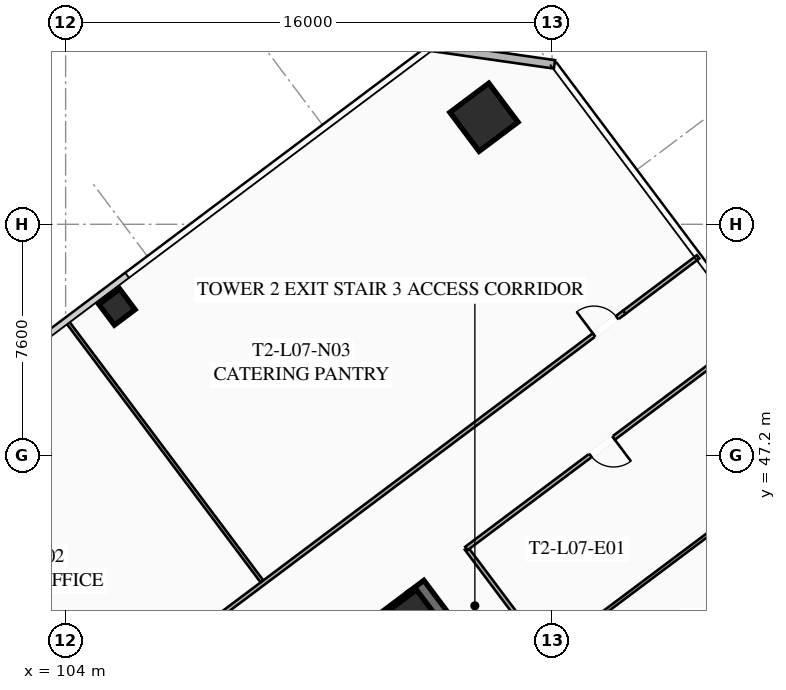
"""IFC4 building model, lengths in metres.
Left out: names, types, materials, properties, quantities, classifications, styles, units other than length and angle.
Written with IfcOpenShell. Run it as: python <this file> out.ifc"""

import sys

from ifc_helpers import new_model, si_unit, direction, frame, frame_2d, origin, origin_2d, place, context, subcontext, project, spatial, rectangle, hollow_rectangle, extrude, element, fill, save


model = new_model("IFC4")
c1 = context("Model", 3, precision=1e-05, world=origin(), true_north=direction((0.0, 1.0)))
c2 = subcontext(c1, "Body", "Model", "MODEL_VIEW")
j1 = project(units=[si_unit("LENGTHUNIT", "METRE"), si_unit("PLANEANGLEUNIT", "RADIAN")], contexts=[c1])
p1 = place(None, origin())
s1 = spatial("IfcSite", under=j1, at=p1, CompositionType="ELEMENT")
p2 = place(p1, origin())
s2 = spatial("IfcBuilding", under=s1, at=p2, CompositionType="ELEMENT")
p3 = place(p2, frame((0.0, 0.0, 31.7)))
s3 = spatial("IfcBuildingStorey", under=s2, at=p3, CompositionType="ELEMENT", Elevation=31.7)
p4 = place(p3, frame((115.524, 42.893, 0.0), z_axis=(0.0, 0.0, 1.0), x_axis=(0.600005007985, -0.799996243986, 0.0)))
e1 = element("IfcWall", 1, at=p4, inside=s3, PredefinedType="SHEAR", context=c2, shape_type="SweptSolid", body=[
    extrude(rectangle(XDim=15.6, YDim=0.65, at=frame_2d((7.8, 0.0))), origin(), (0.0, 0.0, 1.0), 3.55),
])
p5 = place(p3, frame((103.571, 33.522, 0.0), z_axis=(0.0, 0.0, 1.0), x_axis=(0.799998028465, 0.600002628705, 0.0)))
e2 = element("IfcWall", 2, at=p5, inside=s3, PredefinedType="SHEAR", context=c2, shape_type="SweptSolid", body=[
    extrude(rectangle(XDim=14.86, YDim=0.65, at=frame_2d((7.43, 0.0))), origin(), (0.0, 0.0, 1.0), 3.55),
])
p6 = place(p5, frame((4.48, 0.0, 0.0)))
e3 = element("IfcOpeningElement", 3, at=p6, cuts=e2, PredefinedType="OPENING", context=c2, shape_type="SweptSolid", body=[
    extrude(rectangle(XDim=1.25, YDim=2.25, at=frame_2d((0.625, 1.125))), frame((0.0, 0.335, 0.0), z_axis=(0.0, -1.0, 0.0), x_axis=(1.0, 0.0, 0.0)), (0.0, 0.0, 1.0), 0.67),
])
p7 = place(p5, frame((9.53, 0.0, 0.0)))
e4 = element("IfcOpeningElement", 4, at=p7, cuts=e2, PredefinedType="OPENING", context=c2, shape_type="SweptSolid", body=[
    extrude(rectangle(XDim=1.25, YDim=2.25, at=frame_2d((0.625, 1.125))), frame((0.0, 0.335, 0.0), z_axis=(0.0, -1.0, 0.0), x_axis=(1.0, 0.0, 0.0)), (0.0, 0.0, 1.0), 0.67),
])
p8 = place(p3, frame((115.41, 41.87, 0.0), z_axis=(0.0, 0.0, 1.0), x_axis=(0.799999996291, 0.600000004945, 0.0)))
e5 = element("IfcColumn", 5, at=p8, inside=s3, PredefinedType="COLUMN", context=c2, shape_type="SweptSolid", body=[
    extrude(hollow_rectangle(XDim=1.3, YDim=1.3, WallThickness=0.05, at=origin_2d()), origin(), (0.0, 0.0, 1.0), 3.35),
])
p9 = place(p3, frame((117.76, 58.32, 0.0), z_axis=(0.0, 0.0, 1.0), x_axis=(0.799999996291, 0.600000004945, 0.0)))
e6 = element("IfcColumn", 6, at=p9, inside=s3, PredefinedType="COLUMN", context=c2, shape_type="SweptSolid", body=[
    extrude(hollow_rectangle(XDim=1.6, YDim=1.6, WallThickness=0.06, at=origin_2d()), origin(), (0.0, 0.0, 1.0), 3.35),
])
p10 = place(p3, frame((105.69, 52.08, 0.0), z_axis=(0.0, 0.0, 1.0), x_axis=(0.799999996291, 0.600000004945, 0.0)))
e7 = element("IfcColumn", 7, at=p10, inside=s3, PredefinedType="COLUMN", context=c2, shape_type="SweptSolid", body=[
    extrude(hollow_rectangle(XDim=0.85, YDim=0.85, WallThickness=0.035, at=origin_2d()), origin(), (0.0, 0.0, 1.0), 3.35),
])
p11 = place(p3, frame((116.02, 60.64, 0.0), z_axis=(0.0, 0.0, 1.0), x_axis=(0.989955445613, -0.14137968631, 0.0)))
e8 = element("IfcWall", 8, at=p11, inside=s3, PredefinedType="SOLIDWALL", context=c2, shape_type="SweptSolid", body=[
    extrude(rectangle(XDim=4.101, YDim=0.28, at=frame_2d((2.051, 0.0))), origin(), (0.0, 0.0, 1.0), 3.35),
])
p12 = place(p3, frame((119.824, 40.618, 0.0), z_axis=(0.0, 0.0, 1.0), x_axis=(-0.599982243973, 0.800013316712, 0.0)))
e9 = element("IfcWall", 9, at=p12, inside=s3, PredefinedType="PARTITIONING", context=c2, shape_type="SweptSolid", body=[
    extrude(rectangle(XDim=4.4, YDim=0.135, at=frame_2d((2.2, 0.0))), origin(), (0.0, 0.0, 1.0), 2.703),
])
p13 = place(p3, frame((98.516, 34.012, 0.0), z_axis=(0.0, 0.0, 1.0), x_axis=(0.799998035726, 0.600002619023, 0.0)))
e10 = element("IfcWall", 10, at=p13, inside=s3, PredefinedType="PARTITIONING", context=c2, shape_type="SweptSolid", body=[
    extrude(rectangle(XDim=29.83, YDim=0.135, at=frame_2d((14.915, 0.0))), origin(), (0.0, 0.0, 1.0), 2.703),
])
p14 = place(p13, frame((0.3, 0.0, 0.0)))
e11 = element("IfcOpeningElement", 11, at=p14, cuts=e10, PredefinedType="OPENING", context=c2, shape_type="SweptSolid", body=[
    extrude(rectangle(XDim=0.95, YDim=2.05, at=frame_2d((0.475, 1.025))), frame((0.0, 0.077, 0.0), z_axis=(0.0, -1.0, 0.0), x_axis=(1.0, 0.0, 0.0)), (0.0, 0.0, 1.0), 0.155),
])
p15 = place(p13, frame((10.829, 0.0, 0.0)))
e12 = element("IfcOpeningElement", 12, at=p15, cuts=e10, PredefinedType="OPENING", context=c2, shape_type="SweptSolid", body=[
    extrude(rectangle(XDim=0.95, YDim=2.05, at=frame_2d((0.475, 1.025))), frame((0.0, 0.077, 0.0), z_axis=(0.0, -1.0, 0.0), x_axis=(1.0, 0.0, 0.0)), (0.0, 0.0, 1.0), 0.155),
])
p16 = place(p13, frame((28.58, 0.0, 0.0)))
e13 = element("IfcOpeningElement", 13, at=p16, cuts=e10, PredefinedType="OPENING", context=c2, shape_type="SweptSolid", body=[
    extrude(rectangle(XDim=0.95, YDim=2.05, at=frame_2d((0.475, 1.025))), frame((0.0, 0.077, 0.0), z_axis=(0.0, -1.0, 0.0), x_axis=(1.0, 0.0, 0.0)), (0.0, 0.0, 1.0), 0.155),
])
p17 = place(p3, frame((122.38, 51.91, 0.0), z_axis=(0.0, 0.0, 1.0), x_axis=(0.799990331366, 0.600012891296, 0.0)))
e14 = element("IfcWall", 14, at=p17, inside=s3, PredefinedType="PARTITIONING", context=c2, shape_type="SweptSolid", body=[
    extrude(rectangle(XDim=3.03, YDim=0.135, at=frame_2d((1.515, 0.0))), origin(), (0.0, 0.0, 1.0), 2.703),
])
p18 = place(p3, frame((110.452, 43.064, 0.0), z_axis=(0.0, 0.0, 1.0), x_axis=(-0.599992698573, 0.800005476018, 0.0)))
e15 = element("IfcWall", 15, at=p18, inside=s3, PredefinedType="PARTITIONING", context=c2, shape_type="SweptSolid", body=[
    extrude(rectangle(XDim=10.7, YDim=0.11, at=frame_2d((5.35, 0.0))), origin(), (0.0, 0.0, 1.0), 2.703),
])
p19 = place(p3, frame((126.664, 51.248, 0.0), z_axis=(0.0, 0.0, 1.0), x_axis=(-0.799995055373, -0.600006592779, 0.0)))
e16 = element("IfcWall", 16, at=p19, inside=s3, PredefinedType="PARTITIONING", context=c2, shape_type="SweptSolid", body=[
    extrude(rectangle(XDim=11.85, YDim=0.135, at=frame_2d((5.925, 0.0))), origin(), (0.0, 0.0, 1.0), 2.703),
])
p20 = place(p19, frame((5.8, 0.0, 0.0)))
e17 = element("IfcOpeningElement", 17, at=p20, cuts=e16, PredefinedType="OPENING", context=c2, shape_type="SweptSolid", body=[
    extrude(rectangle(XDim=0.95, YDim=2.05, at=frame_2d((0.475, 1.025))), frame((0.0, 0.077, 0.0), z_axis=(0.0, -1.0, 0.0), x_axis=(1.0, 0.0, 0.0)), (0.0, 0.0, 1.0), 0.155),
])
p21 = place(p3, frame((129.304, 47.728, 0.0), z_axis=(0.0, 0.0, 1.0), x_axis=(-0.8, -0.6, 0.0)))
e18 = element("IfcWall", 18, at=p21, inside=s3, PredefinedType="PARTITIONING", context=c2, shape_type="SweptSolid", body=[
    extrude(rectangle(XDim=10.0, YDim=0.11, at=frame_2d((5.0, 0.0))), origin(), (0.0, 0.0, 1.0), 2.703),
])
p22 = place(p16, origin())
e19 = element("IfcDoor", 19, at=p22, inside=s3, OperationType="SINGLE_SWING_LEFT", PredefinedType="DOOR", context=c2, shape_type="SweptSolid", body=[
    extrude(rectangle(XDim=0.95, YDim=2.05, at=frame_2d((0.475, 1.025))), frame((0.0, 0.025, 0.0), z_axis=(0.0, -1.0, 0.0), x_axis=(1.0, 0.0, 0.0)), (0.0, 0.0, 1.0), 0.05),
])
fill(e13, e19)
p23 = place(p20, origin())
e20 = element("IfcDoor", 20, at=p23, inside=s3, OperationType="SINGLE_SWING_LEFT", PredefinedType="DOOR", context=c2, shape_type="SweptSolid", body=[
    extrude(rectangle(XDim=0.95, YDim=2.05, at=frame_2d((0.475, 1.025))), frame((0.0, 0.025, 0.0), z_axis=(0.0, -1.0, 0.0), x_axis=(1.0, 0.0, 0.0)), (0.0, 0.0, 1.0), 0.05),
])
fill(e17, e20)
save(model, sys.argv[1])
